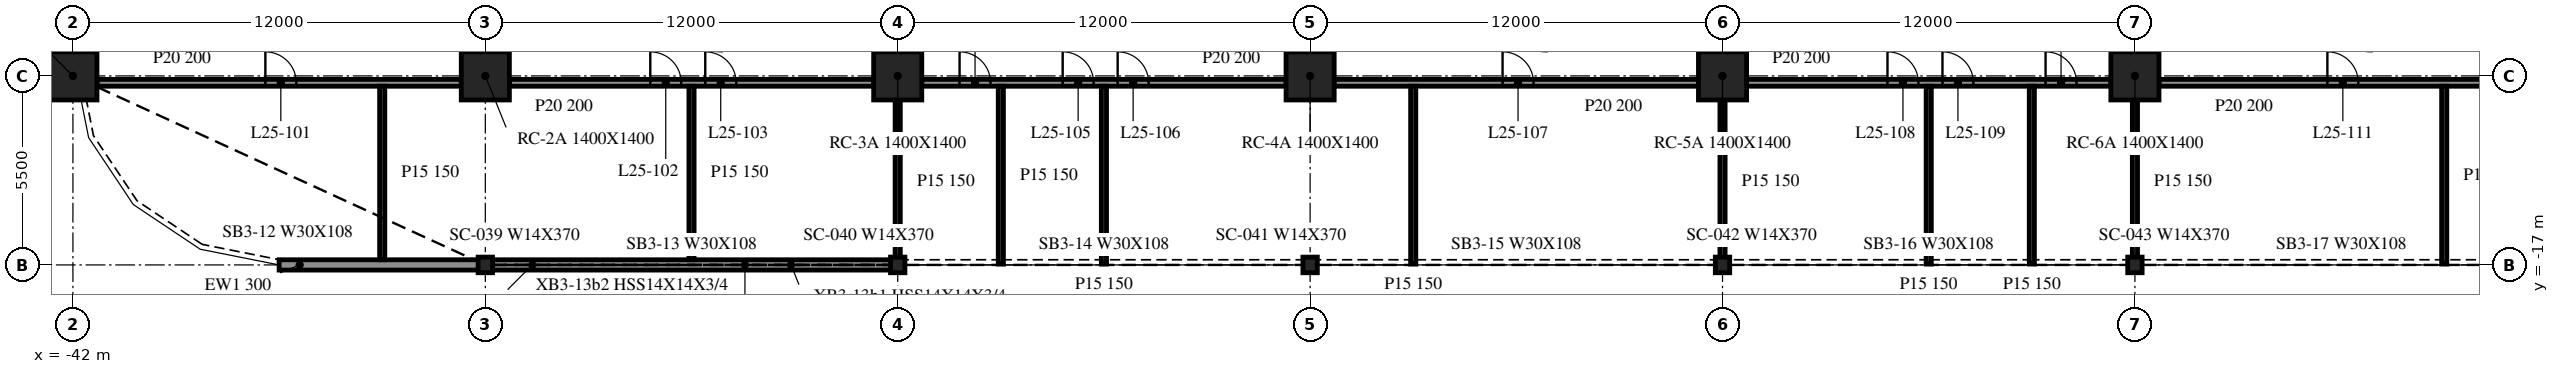
"""IFC4 building model, lengths in metres.
Left out: names, types, materials, properties, quantities, classifications, styles, units other than length and angle.
Written with IfcOpenShell. Run it as: python <this file> out.ifc"""

import sys

from ifc_helpers import new_model, si_unit, direction, frame, frame_2d, origin, origin_2d, place, context, subcontext, project, spatial, rectangle, i_section, extrude, element, fill, save


model = new_model("IFC4")
c1 = context("Model", 3, precision=1e-05, world=origin(), true_north=direction((0.0, 1.0)))
c2 = subcontext(c1, "Body", "Model", "MODEL_VIEW")
j1 = project(units=[si_unit("LENGTHUNIT", "METRE"), si_unit("PLANEANGLEUNIT", "RADIAN")], contexts=[c1])
p1 = place(None, origin())
s1 = spatial("IfcSite", under=j1, at=p1, CompositionType="ELEMENT")
p2 = place(p1, origin())
s2 = spatial("IfcBuilding", under=s1, at=p2, CompositionType="ELEMENT")
p3 = place(p2, frame((0.0, 0.0, 109.4)))
s3 = spatial("IfcBuildingStorey", under=s2, at=p3, CompositionType="ELEMENT", Elevation=109.4)
for number, where, z_axis, x_axis in (
    (1, (-42.0, -11.5, -0.34), (0.0, 0.0, 1.0), (1.0, 0.0, 0.0)),
    (2, (-30.0, -11.5, -0.34), (0.0, 0.0, 1.0), (1.0, 0.0, 0.0)),
    (3, (-18.0, -11.5, -0.34), (0.0, 0.0, 1.0), (1.0, 0.0, 0.0)),
    (4, (-6.0, -11.5, -0.34), (0.0, 0.0, 1.0), (1.0, 0.0, 0.0)),
    (5, (6.0, -11.5, -0.34), (0.0, 0.0, 1.0), (1.0, 0.0, 0.0)),
    (6, (18.0, -11.5, -0.34), (0.0, 0.0, 1.0), (1.0, 0.0, 0.0)),
):
    element("IfcColumn", number, at=place(p3, frame(where, z_axis=z_axis, x_axis=x_axis)), inside=s3, PredefinedType="COLUMN", context=c2, shape_type="SweptSolid", body=[
        extrude(rectangle(XDim=1.4, YDim=1.4, at=origin_2d()), origin(), (0.0, 0.0, 1.0), 4.1),
    ])
for number, where, z_axis, x_axis in (
    (7, (-30.0, -17.0, -0.34), (0.0, 0.0, 1.0), (1.0, 0.0, 0.0)),
    (8, (-18.0, -17.0, -0.34), (0.0, 0.0, 1.0), (1.0, 0.0, 0.0)),
    (9, (-6.0, -17.0, -0.34), (0.0, 0.0, 1.0), (1.0, 0.0, 0.0)),
    (10, (6.0, -17.0, -0.34), (0.0, 0.0, 1.0), (1.0, 0.0, 0.0)),
    (11, (18.0, -17.0, -0.34), (0.0, 0.0, 1.0), (1.0, 0.0, 0.0)),
):
    element("IfcColumn", number, at=place(p3, frame(where, z_axis=z_axis, x_axis=x_axis)), inside=s3, PredefinedType="COLUMN", context=c2, shape_type="SweptSolid", body=[
        extrude(i_section(OverallWidth=0.419, OverallDepth=0.455, WebThickness=0.042, FlangeThickness=0.068, at=origin_2d()), origin(), (0.0, 0.0, 1.0), 4.1),
    ])
p4 = place(p3, frame((-36.0, -17.0, 0.0), z_axis=(0.0, 0.0, 1.0), x_axis=(1.0, 0.0, 0.0)))
e12 = element("IfcWall", 12, at=p4, inside=s3, PredefinedType="NOTDEFINED", context=c2, shape_type="SweptSolid", body=[
    extrude(rectangle(XDim=5.979, YDim=0.3, at=frame_2d((2.99, 0.0))), origin(), (0.0, 0.0, 1.0), 3.003),
])
p5 = place(p3, frame((-29.979, -17.0, 0.0), z_axis=(0.0, 0.0, 1.0), x_axis=(1.0, 0.0, 0.0)))
e13 = element("IfcWall", 13, at=p5, inside=s3, PredefinedType="NOTDEFINED", context=c2, shape_type="SweptSolid", body=[
    extrude(rectangle(XDim=11.958, YDim=0.3, at=frame_2d((5.979, 0.0))), origin(), (0.0, 0.0, 1.0), 3.003),
])
p6 = place(p3, frame((-41.3, -11.7, 0.0), z_axis=(0.0, 0.0, 1.0), x_axis=(1.0, 0.0, 0.0)))
e14 = element("IfcWall", 14, at=p6, inside=s3, PredefinedType="PARTITIONING", context=c2, shape_type="SweptSolid", body=[
    extrude(rectangle(XDim=10.6, YDim=0.2, at=frame_2d((5.3, 0.0))), origin(), (0.0, 0.0, 1.0), 3.76),
])
p7 = place(p6, frame((4.9, 0.0, 0.0)))
e15 = element("IfcOpeningElement", 15, at=p7, cuts=e14, PredefinedType="OPENING", context=c2, shape_type="SweptSolid", body=[
    extrude(rectangle(XDim=0.9, YDim=2.1, at=frame_2d((0.45, 1.05))), frame((0.0, 0.11, 0.0), z_axis=(0.0, -1.0, 0.0), x_axis=(1.0, 0.0, 0.0)), (0.0, 0.0, 1.0), 0.22),
])
p8 = place(p3, frame((-29.3, -11.7, 0.0), z_axis=(0.0, 0.0, 1.0), x_axis=(1.0, 0.0, 0.0)))
e16 = element("IfcWall", 16, at=p8, inside=s3, PredefinedType="PARTITIONING", context=c2, shape_type="SweptSolid", body=[
    extrude(rectangle(XDim=10.6, YDim=0.2, at=frame_2d((5.3, 0.0))), origin(), (0.0, 0.0, 1.0), 3.76),
])
p9 = place(p8, frame((4.1, 0.0, 0.0)))
e17 = element("IfcOpeningElement", 17, at=p9, cuts=e16, PredefinedType="OPENING", context=c2, shape_type="SweptSolid", body=[
    extrude(rectangle(XDim=0.9, YDim=2.1, at=frame_2d((0.45, 1.05))), frame((0.0, 0.11, 0.0), z_axis=(0.0, -1.0, 0.0), x_axis=(1.0, 0.0, 0.0)), (0.0, 0.0, 1.0), 0.22),
])
p10 = place(p8, frame((5.7, 0.0, 0.0)))
e18 = element("IfcOpeningElement", 18, at=p10, cuts=e16, PredefinedType="OPENING", context=c2, shape_type="SweptSolid", body=[
    extrude(rectangle(XDim=0.9, YDim=2.1, at=frame_2d((0.45, 1.05))), frame((0.0, 0.11, 0.0), z_axis=(0.0, -1.0, 0.0), x_axis=(1.0, 0.0, 0.0)), (0.0, 0.0, 1.0), 0.22),
])
p11 = place(p3, frame((-17.3, -11.7, 0.0), z_axis=(0.0, 0.0, 1.0), x_axis=(1.0, 0.0, 0.0)))
e19 = element("IfcWall", 19, at=p11, inside=s3, PredefinedType="PARTITIONING", context=c2, shape_type="SweptSolid", body=[
    extrude(rectangle(XDim=10.6, YDim=0.2, at=frame_2d((5.3, 0.0))), origin(), (0.0, 0.0, 1.0), 3.76),
])
p12 = place(p11, frame((1.1, 0.0, 0.0)))
e20 = element("IfcOpeningElement", 20, at=p12, cuts=e19, PredefinedType="OPENING", context=c2, shape_type="SweptSolid", body=[
    extrude(rectangle(XDim=0.9, YDim=2.1, at=frame_2d((0.45, 1.05))), frame((0.0, 0.11, 0.0), z_axis=(0.0, -1.0, 0.0), x_axis=(1.0, 0.0, 0.0)), (0.0, 0.0, 1.0), 0.22),
])
p13 = place(p11, frame((4.1, 0.0, 0.0)))
e21 = element("IfcOpeningElement", 21, at=p13, cuts=e19, PredefinedType="OPENING", context=c2, shape_type="SweptSolid", body=[
    extrude(rectangle(XDim=0.9, YDim=2.1, at=frame_2d((0.45, 1.05))), frame((0.0, 0.11, 0.0), z_axis=(0.0, -1.0, 0.0), x_axis=(1.0, 0.0, 0.0)), (0.0, 0.0, 1.0), 0.22),
])
p14 = place(p11, frame((5.7, 0.0, 0.0)))
e22 = element("IfcOpeningElement", 22, at=p14, cuts=e19, PredefinedType="OPENING", context=c2, shape_type="SweptSolid", body=[
    extrude(rectangle(XDim=0.9, YDim=2.1, at=frame_2d((0.45, 1.05))), frame((0.0, 0.11, 0.0), z_axis=(0.0, -1.0, 0.0), x_axis=(1.0, 0.0, 0.0)), (0.0, 0.0, 1.0), 0.22),
])
p15 = place(p3, frame((-5.3, -11.7, 0.0), z_axis=(0.0, 0.0, 1.0), x_axis=(1.0, 0.0, 0.0)))
e23 = element("IfcWall", 23, at=p15, inside=s3, PredefinedType="PARTITIONING", context=c2, shape_type="SweptSolid", body=[
    extrude(rectangle(XDim=10.6, YDim=0.2, at=frame_2d((5.3, 0.0))), origin(), (0.0, 0.0, 1.0), 3.76),
])
p16 = place(p15, frame((4.9, 0.0, 0.0)))
e24 = element("IfcOpeningElement", 24, at=p16, cuts=e23, PredefinedType="OPENING", context=c2, shape_type="SweptSolid", body=[
    extrude(rectangle(XDim=0.9, YDim=2.1, at=frame_2d((0.45, 1.05))), frame((0.0, 0.11, 0.0), z_axis=(0.0, -1.0, 0.0), x_axis=(1.0, 0.0, 0.0)), (0.0, 0.0, 1.0), 0.22),
])
p17 = place(p3, frame((6.7, -11.7, 0.0), z_axis=(0.0, 0.0, 1.0), x_axis=(1.0, 0.0, 0.0)))
e25 = element("IfcWall", 25, at=p17, inside=s3, PredefinedType="PARTITIONING", context=c2, shape_type="SweptSolid", body=[
    extrude(rectangle(XDim=10.6, YDim=0.2, at=frame_2d((5.3, 0.0))), origin(), (0.0, 0.0, 1.0), 3.76),
])
p18 = place(p17, frame((4.1, 0.0, 0.0)))
e26 = element("IfcOpeningElement", 26, at=p18, cuts=e25, PredefinedType="OPENING", context=c2, shape_type="SweptSolid", body=[
    extrude(rectangle(XDim=0.9, YDim=2.1, at=frame_2d((0.45, 1.05))), frame((0.0, 0.11, 0.0), z_axis=(0.0, -1.0, 0.0), x_axis=(1.0, 0.0, 0.0)), (0.0, 0.0, 1.0), 0.22),
])
p19 = place(p17, frame((5.7, 0.0, 0.0)))
e27 = element("IfcOpeningElement", 27, at=p19, cuts=e25, PredefinedType="OPENING", context=c2, shape_type="SweptSolid", body=[
    extrude(rectangle(XDim=0.9, YDim=2.1, at=frame_2d((0.45, 1.05))), frame((0.0, 0.11, 0.0), z_axis=(0.0, -1.0, 0.0), x_axis=(1.0, 0.0, 0.0)), (0.0, 0.0, 1.0), 0.22),
])
p20 = place(p17, frame((8.7, 0.0, 0.0)))
e28 = element("IfcOpeningElement", 28, at=p20, cuts=e25, PredefinedType="OPENING", context=c2, shape_type="SweptSolid", body=[
    extrude(rectangle(XDim=0.9, YDim=2.1, at=frame_2d((0.45, 1.05))), frame((0.0, 0.11, 0.0), z_axis=(0.0, -1.0, 0.0), x_axis=(1.0, 0.0, 0.0)), (0.0, 0.0, 1.0), 0.22),
])
p21 = place(p3, frame((18.7, -11.7, 0.0), z_axis=(0.0, 0.0, 1.0), x_axis=(1.0, 0.0, 0.0)))
e29 = element("IfcWall", 29, at=p21, inside=s3, PredefinedType="PARTITIONING", context=c2, shape_type="SweptSolid", body=[
    extrude(rectangle(XDim=10.6, YDim=0.2, at=frame_2d((5.3, 0.0))), origin(), (0.0, 0.0, 1.0), 3.76),
])
p22 = place(p21, frame((4.9, 0.0, 0.0)))
e30 = element("IfcOpeningElement", 30, at=p22, cuts=e29, PredefinedType="OPENING", context=c2, shape_type="SweptSolid", body=[
    extrude(rectangle(XDim=0.9, YDim=2.1, at=frame_2d((0.45, 1.05))), frame((0.0, 0.11, 0.0), z_axis=(0.0, -1.0, 0.0), x_axis=(1.0, 0.0, 0.0)), (0.0, 0.0, 1.0), 0.22),
])
for number, where, z_axis, x_axis in (
    (31, (-33.0, -16.85, 0.0), (0.0, 0.0, 1.0), (0.0, 1.0, 0.0)),
    (32, (-24.0, -16.85, 0.0), (0.0, 0.0, 1.0), (0.0, 1.0, 0.0)),
):
    element("IfcWall", number, at=place(p3, frame(where, z_axis=z_axis, x_axis=x_axis)), inside=s3, PredefinedType="PARTITIONING", context=c2, shape_type="SweptSolid", body=[
        extrude(rectangle(XDim=5.05, YDim=0.15, at=frame_2d((2.525, 0.0))), origin(), (0.0, 0.0, 1.0), 3.76),
    ])
p23 = place(p3, frame((-18.0, -16.975, 0.0), z_axis=(0.0, 0.0, 1.0), x_axis=(0.0, 1.0, 0.0)))
e33 = element("IfcWall", 33, at=p23, inside=s3, PredefinedType="PARTITIONING", context=c2, shape_type="SweptSolid", body=[
    extrude(rectangle(XDim=4.775, YDim=0.15, at=frame_2d((2.388, 0.0))), origin(), (0.0, 0.0, 1.0), 3.76),
])
for number, where, z_axis, x_axis in (
    (34, (-15.0, -16.975, 0.0), (0.0, 0.0, 1.0), (0.0, 1.0, 0.0)),
    (35, (-12.0, -16.975, 0.0), (0.0, 0.0, 1.0), (0.0, 1.0, 0.0)),
    (36, (-3.0, -16.975, 0.0), (0.0, 0.0, 1.0), (0.0, 1.0, 0.0)),
):
    element("IfcWall", number, at=place(p3, frame(where, z_axis=z_axis, x_axis=x_axis)), inside=s3, PredefinedType="PARTITIONING", context=c2, shape_type="SweptSolid", body=[
        extrude(rectangle(XDim=5.175, YDim=0.15, at=frame_2d((2.587, 0.0))), origin(), (0.0, 0.0, 1.0), 3.76),
    ])
p24 = place(p3, frame((6.0, -16.975, 0.0), z_axis=(0.0, 0.0, 1.0), x_axis=(0.0, 1.0, 0.0)))
e37 = element("IfcWall", 37, at=p24, inside=s3, PredefinedType="PARTITIONING", context=c2, shape_type="SweptSolid", body=[
    extrude(rectangle(XDim=4.775, YDim=0.15, at=frame_2d((2.388, 0.0))), origin(), (0.0, 0.0, 1.0), 3.76),
])
for number, where, z_axis, x_axis in (
    (38, (12.0, -16.975, 0.0), (0.0, 0.0, 1.0), (0.0, 1.0, 0.0)),
    (39, (15.0, -16.975, 0.0), (0.0, 0.0, 1.0), (0.0, 1.0, 0.0)),
):
    element("IfcWall", number, at=place(p3, frame(where, z_axis=z_axis, x_axis=x_axis)), inside=s3, PredefinedType="PARTITIONING", context=c2, shape_type="SweptSolid", body=[
        extrude(rectangle(XDim=5.175, YDim=0.15, at=frame_2d((2.587, 0.0))), origin(), (0.0, 0.0, 1.0), 3.76),
    ])
p25 = place(p3, frame((18.0, -16.975, 0.0), z_axis=(0.0, 0.0, 1.0), x_axis=(0.0, 1.0, 0.0)))
e40 = element("IfcWall", 40, at=p25, inside=s3, PredefinedType="PARTITIONING", context=c2, shape_type="SweptSolid", body=[
    extrude(rectangle(XDim=4.775, YDim=0.15, at=frame_2d((2.388, 0.0))), origin(), (0.0, 0.0, 1.0), 3.76),
])
p26 = place(p3, frame((27.0, -16.975, 0.0), z_axis=(0.0, 0.0, 1.0), x_axis=(0.0, 1.0, 0.0)))
e41 = element("IfcWall", 41, at=p26, inside=s3, PredefinedType="PARTITIONING", context=c2, shape_type="SweptSolid", body=[
    extrude(rectangle(XDim=5.175, YDim=0.15, at=frame_2d((2.587, 0.0))), origin(), (0.0, 0.0, 1.0), 3.76),
])
p27 = place(p7, origin())
e42 = element("IfcDoor", 42, at=p27, inside=s3, OperationType="SINGLE_SWING_LEFT", PredefinedType="DOOR", context=c2, shape_type="SweptSolid", body=[
    extrude(rectangle(XDim=0.9, YDim=2.1, at=frame_2d((0.45, 1.05))), frame((0.0, 0.025, 0.0), z_axis=(0.0, -1.0, 0.0), x_axis=(1.0, 0.0, 0.0)), (0.0, 0.0, 1.0), 0.05),
])
fill(e15, e42)
p28 = place(p9, origin())
e43 = element("IfcDoor", 43, at=p28, inside=s3, OperationType="SINGLE_SWING_RIGHT", PredefinedType="DOOR", context=c2, shape_type="SweptSolid", body=[
    extrude(rectangle(XDim=0.9, YDim=2.1, at=frame_2d((0.45, 1.05))), frame((0.0, 0.025, 0.0), z_axis=(0.0, -1.0, 0.0), x_axis=(1.0, 0.0, 0.0)), (0.0, 0.0, 1.0), 0.05),
])
fill(e17, e43)
p29 = place(p10, origin())
e44 = element("IfcDoor", 44, at=p29, inside=s3, OperationType="SINGLE_SWING_LEFT", PredefinedType="DOOR", context=c2, shape_type="SweptSolid", body=[
    extrude(rectangle(XDim=0.9, YDim=2.1, at=frame_2d((0.45, 1.05))), frame((0.0, 0.025, 0.0), z_axis=(0.0, -1.0, 0.0), x_axis=(1.0, 0.0, 0.0)), (0.0, 0.0, 1.0), 0.05),
])
fill(e18, e44)
p30 = place(p12, origin())
e45 = element("IfcDoor", 45, at=p30, inside=s3, OperationType="SINGLE_SWING_RIGHT", PredefinedType="DOOR", context=c2, shape_type="SweptSolid", body=[
    extrude(rectangle(XDim=0.9, YDim=2.1, at=frame_2d((0.45, 1.05))), frame((0.0, 0.025, 0.0), z_axis=(0.0, -1.0, 0.0), x_axis=(1.0, 0.0, 0.0)), (0.0, 0.0, 1.0), 0.05),
])
fill(e20, e45)
p31 = place(p13, origin())
e46 = element("IfcDoor", 46, at=p31, inside=s3, OperationType="SINGLE_SWING_RIGHT", PredefinedType="DOOR", context=c2, shape_type="SweptSolid", body=[
    extrude(rectangle(XDim=0.9, YDim=2.1, at=frame_2d((0.45, 1.05))), frame((0.0, 0.025, 0.0), z_axis=(0.0, -1.0, 0.0), x_axis=(1.0, 0.0, 0.0)), (0.0, 0.0, 1.0), 0.05),
])
fill(e21, e46)
p32 = place(p14, origin())
e47 = element("IfcDoor", 47, at=p32, inside=s3, OperationType="SINGLE_SWING_LEFT", PredefinedType="DOOR", context=c2, shape_type="SweptSolid", body=[
    extrude(rectangle(XDim=0.9, YDim=2.1, at=frame_2d((0.45, 1.05))), frame((0.0, 0.025, 0.0), z_axis=(0.0, -1.0, 0.0), x_axis=(1.0, 0.0, 0.0)), (0.0, 0.0, 1.0), 0.05),
])
fill(e22, e47)
p33 = place(p16, origin())
e48 = element("IfcDoor", 48, at=p33, inside=s3, OperationType="SINGLE_SWING_LEFT", PredefinedType="DOOR", context=c2, shape_type="SweptSolid", body=[
    extrude(rectangle(XDim=0.9, YDim=2.1, at=frame_2d((0.45, 1.05))), frame((0.0, 0.025, 0.0), z_axis=(0.0, -1.0, 0.0), x_axis=(1.0, 0.0, 0.0)), (0.0, 0.0, 1.0), 0.05),
])
fill(e24, e48)
p34 = place(p18, origin())
e49 = element("IfcDoor", 49, at=p34, inside=s3, OperationType="SINGLE_SWING_RIGHT", PredefinedType="DOOR", context=c2, shape_type="SweptSolid", body=[
    extrude(rectangle(XDim=0.9, YDim=2.1, at=frame_2d((0.45, 1.05))), frame((0.0, 0.025, 0.0), z_axis=(0.0, -1.0, 0.0), x_axis=(1.0, 0.0, 0.0)), (0.0, 0.0, 1.0), 0.05),
])
fill(e26, e49)
p35 = place(p19, origin())
e50 = element("IfcDoor", 50, at=p35, inside=s3, OperationType="SINGLE_SWING_LEFT", PredefinedType="DOOR", context=c2, shape_type="SweptSolid", body=[
    extrude(rectangle(XDim=0.9, YDim=2.1, at=frame_2d((0.45, 1.05))), frame((0.0, 0.025, 0.0), z_axis=(0.0, -1.0, 0.0), x_axis=(1.0, 0.0, 0.0)), (0.0, 0.0, 1.0), 0.05),
])
fill(e27, e50)
p36 = place(p20, origin())
e51 = element("IfcDoor", 51, at=p36, inside=s3, OperationType="SINGLE_SWING_LEFT", PredefinedType="DOOR", context=c2, shape_type="SweptSolid", body=[
    extrude(rectangle(XDim=0.9, YDim=2.1, at=frame_2d((0.45, 1.05))), frame((0.0, 0.025, 0.0), z_axis=(0.0, -1.0, 0.0), x_axis=(1.0, 0.0, 0.0)), (0.0, 0.0, 1.0), 0.05),
])
fill(e28, e51)
p37 = place(p22, origin())
e52 = element("IfcDoor", 52, at=p37, inside=s3, OperationType="SINGLE_SWING_LEFT", PredefinedType="DOOR", context=c2, shape_type="SweptSolid", body=[
    extrude(rectangle(XDim=0.9, YDim=2.1, at=frame_2d((0.45, 1.05))), frame((0.0, 0.025, 0.0), z_axis=(0.0, -1.0, 0.0), x_axis=(1.0, 0.0, 0.0)), (0.0, 0.0, 1.0), 0.05),
])
fill(e30, e52)
save(model, sys.argv[1])
